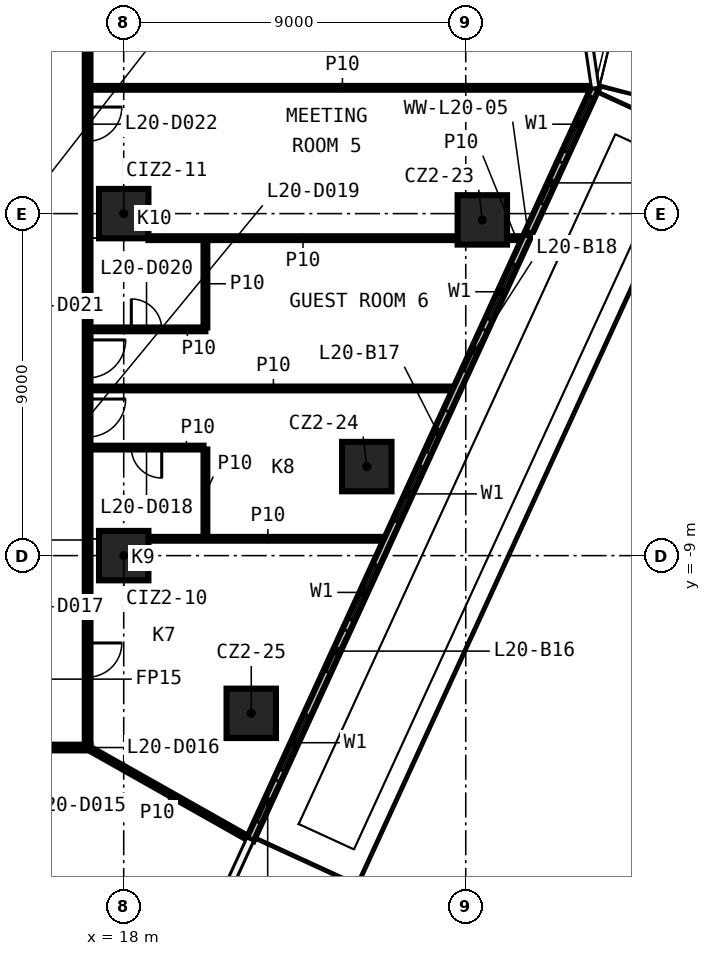
"""IFC4 building model, lengths in metres.
Left out: names, types, materials, properties, quantities, classifications, styles, units other than length and angle.
Written with IfcOpenShell. Run it as: python <this file> out.ifc"""

import sys

from ifc_helpers import new_model, si_unit, direction, frame, frame_2d, origin, origin_2d, place, context, subcontext, project, spatial, rectangle, extrude, element, fill, save


model = new_model("IFC4")
c1 = context("Model", 3, precision=1e-05, world=origin(), true_north=direction((0.0, 1.0)))
c2 = subcontext(c1, "Body", "Model", "MODEL_VIEW")
j1 = project(units=[si_unit("LENGTHUNIT", "METRE"), si_unit("PLANEANGLEUNIT", "RADIAN")], contexts=[c1])
p1 = place(None, origin())
s1 = spatial("IfcSite", under=j1, at=p1, CompositionType="ELEMENT")
p2 = place(p1, origin())
s2 = spatial("IfcBuilding", under=s1, at=p2, CompositionType="ELEMENT")
p3 = place(p2, frame((0.0, 0.0, 98.9)))
s3 = spatial("IfcBuildingStorey", under=s2, at=p3, CompositionType="ELEMENT", Elevation=98.9)
for number, where, z_axis, x_axis in (
    (1, (27.436, -0.165, 0.0), (0.0, 0.0, 1.0), (1.0, 0.0, 0.0)),
    (2, (24.396, -6.657, 0.0), (0.0, 0.0, 1.0), (1.0, 0.0, 0.0)),
    (3, (21.356, -13.15, 0.0), (0.0, 0.0, 1.0), (1.0, 0.0, 0.0)),
    (4, (18.0, -9.0, 0.0), (0.0, 0.0, 1.0), (1.0, 0.0, 0.0)),
    (5, (18.0, 0.0, 0.0), (0.0, 0.0, 1.0), (1.0, 0.0, 0.0)),
):
    element("IfcColumn", number, at=place(p3, frame(where, z_axis=z_axis, x_axis=x_axis)), inside=s3, PredefinedType="COLUMN", context=c2, shape_type="SweptSolid", body=[
        extrude(rectangle(XDim=1.3, YDim=1.3, at=origin_2d()), origin(), (0.0, 0.0, 1.0), 3.25),
    ])
p4 = place(p3, frame((17.125, -14.05, 0.0), z_axis=(0.0, 0.0, 1.0), x_axis=(-1.0, 0.0, 0.0)))
e6 = element("IfcWall", 6, at=p4, inside=s3, PredefinedType="PARTITIONING", context=c2, shape_type="SweptSolid", body=[
    extrude(rectangle(XDim=34.25, YDim=0.15, at=frame_2d((17.125, 0.0))), origin(), (0.0, 0.0, 1.0), 3.25),
])
p5 = place(p4, frame((32.158, 0.0, 0.0)))
e7 = element("IfcOpeningElement", 7, at=p5, cuts=e6, PredefinedType="OPENING", context=c2, shape_type="SweptSolid", body=[
    extrude(rectangle(XDim=0.9, YDim=2.1, at=frame_2d((0.45, 1.05))), frame((0.0, 0.085, 0.0), z_axis=(0.0, -1.0, 0.0), x_axis=(1.0, 0.0, 0.0)), (0.0, 0.0, 1.0), 0.17),
])
p6 = place(p4, frame((27.561, 0.0, 0.0)))
e8 = element("IfcOpeningElement", 8, at=p6, cuts=e6, PredefinedType="OPENING", context=c2, shape_type="SweptSolid", body=[
    extrude(rectangle(XDim=1.0, YDim=2.1, at=frame_2d((0.5, 1.05))), frame((0.0, 0.085, 0.0), z_axis=(0.0, -1.0, 0.0), x_axis=(1.0, 0.0, 0.0)), (0.0, 0.0, 1.0), 0.17),
])
p7 = place(p4, frame((18.64, 0.0, 0.0)))
e9 = element("IfcOpeningElement", 9, at=p7, cuts=e6, PredefinedType="OPENING", context=c2, shape_type="SweptSolid", body=[
    extrude(rectangle(XDim=1.0, YDim=2.1, at=frame_2d((0.5, 1.05))), frame((0.0, 0.085, 0.0), z_axis=(0.0, -1.0, 0.0), x_axis=(1.0, 0.0, 0.0)), (0.0, 0.0, 1.0), 0.17),
])
p8 = place(p4, frame((16.624, 0.0, 0.0)))
e10 = element("IfcOpeningElement", 10, at=p8, cuts=e6, PredefinedType="OPENING", context=c2, shape_type="SweptSolid", body=[
    extrude(rectangle(XDim=1.0, YDim=2.1, at=frame_2d((0.5, 1.05))), frame((0.0, 0.085, 0.0), z_axis=(0.0, -1.0, 0.0), x_axis=(1.0, 0.0, 0.0)), (0.0, 0.0, 1.0), 0.17),
])
p9 = place(p4, frame((9.807, 0.0, 0.0)))
e11 = element("IfcOpeningElement", 11, at=p9, cuts=e6, PredefinedType="OPENING", context=c2, shape_type="SweptSolid", body=[
    extrude(rectangle(XDim=1.0, YDim=2.1, at=frame_2d((0.5, 1.05))), frame((0.0, 0.085, 0.0), z_axis=(0.0, -1.0, 0.0), x_axis=(1.0, 0.0, 0.0)), (0.0, 0.0, 1.0), 0.17),
])
p10 = place(p4, frame((7.795, 0.0, 0.0)))
e12 = element("IfcOpeningElement", 12, at=p10, cuts=e6, PredefinedType="OPENING", context=c2, shape_type="SweptSolid", body=[
    extrude(rectangle(XDim=1.0, YDim=2.1, at=frame_2d((0.5, 1.05))), frame((0.0, 0.085, 0.0), z_axis=(0.0, -1.0, 0.0), x_axis=(1.0, 0.0, 0.0)), (0.0, 0.0, 1.0), 0.17),
])
p11 = place(p4, frame((1.119, 0.0, 0.0)))
e13 = element("IfcOpeningElement", 13, at=p11, cuts=e6, PredefinedType="OPENING", context=c2, shape_type="SweptSolid", body=[
    extrude(rectangle(XDim=1.0, YDim=2.1, at=frame_2d((0.5, 1.05))), frame((0.0, 0.085, 0.0), z_axis=(0.0, -1.0, 0.0), x_axis=(1.0, 0.0, 0.0)), (0.0, 0.0, 1.0), 0.17),
])
p12 = place(p3, frame((18.65, -8.557, 0.0), z_axis=(0.0, 0.0, 1.0), x_axis=(1.0, 0.0, 0.0)))
e14 = element("IfcWall", 14, at=p12, inside=s3, PredefinedType="PARTITIONING", context=c2, shape_type="SweptSolid", body=[
    extrude(rectangle(XDim=6.288, YDim=0.1, at=frame_2d((3.144, 0.0))), origin(), (0.0, 0.0, 1.0), 3.25),
])
p13 = place(p3, frame((20.1, -6.157, 0.0), z_axis=(0.0, 0.0, 1.0), x_axis=(-1.0, 0.0, 0.0)))
e15 = element("IfcWall", 15, at=p13, inside=s3, PredefinedType="PARTITIONING", context=c2, shape_type="SweptSolid", body=[
    extrude(rectangle(XDim=2.975, YDim=0.1, at=frame_2d((1.488, 0.0))), origin(), (0.0, 0.0, 1.0), 3.25),
])
p14 = place(p13, frame((1.1, 0.0, 0.0)))
e16 = element("IfcOpeningElement", 16, at=p14, cuts=e15, PredefinedType="OPENING", context=c2, shape_type="SweptSolid", body=[
    extrude(rectangle(XDim=0.8, YDim=2.1, at=frame_2d((0.4, 1.05))), frame((0.0, 0.06, 0.0), z_axis=(0.0, -1.0, 0.0), x_axis=(1.0, 0.0, 0.0)), (0.0, 0.0, 1.0), 0.12),
])
p15 = place(p3, frame((17.125, -4.601, 0.0), z_axis=(0.0, 0.0, 1.0), x_axis=(1.0, 0.0, 0.0)))
e17 = element("IfcWall", 17, at=p15, inside=s3, PredefinedType="PARTITIONING", context=c2, shape_type="SweptSolid", body=[
    extrude(rectangle(XDim=9.629, YDim=0.1, at=frame_2d((4.814, 0.0))), origin(), (0.0, 0.0, 1.0), 3.25),
])
p16 = place(p3, frame((17.125, -3.046, 0.0), z_axis=(0.0, 0.0, 1.0), x_axis=(1.0, 0.0, 0.0)))
e18 = element("IfcWall", 18, at=p16, inside=s3, PredefinedType="PARTITIONING", context=c2, shape_type="SweptSolid", body=[
    extrude(rectangle(XDim=3.025, YDim=0.1, at=frame_2d((1.512, 0.0))), origin(), (0.0, 0.0, 1.0), 3.25),
])
p17 = place(p16, frame((1.075, 0.0, 0.0)))
e19 = element("IfcOpeningElement", 19, at=p17, cuts=e18, PredefinedType="OPENING", context=c2, shape_type="SweptSolid", body=[
    extrude(rectangle(XDim=0.8, YDim=2.1, at=frame_2d((0.4, 1.05))), frame((0.0, 0.06, 0.0), z_axis=(0.0, -1.0, 0.0), x_axis=(1.0, 0.0, 0.0)), (0.0, 0.0, 1.0), 0.12),
])
p18 = place(p3, frame((18.65, -0.646, 0.0), z_axis=(0.0, 0.0, 1.0), x_axis=(1.0, 0.0, 0.0)))
e20 = element("IfcWall", 20, at=p18, inside=s3, PredefinedType="PARTITIONING", context=c2, shape_type="SweptSolid", body=[
    extrude(rectangle(XDim=8.136, YDim=0.1, at=frame_2d((4.068, 0.0))), origin(), (0.0, 0.0, 1.0), 3.25),
])
p19 = place(p3, frame((28.086, -0.646, 0.0), z_axis=(0.0, 0.0, 1.0), x_axis=(1.0, 0.0, 0.0)))
e21 = element("IfcWall", 21, at=p19, inside=s3, PredefinedType="PARTITIONING", context=c2, shape_type="SweptSolid", body=[
    extrude(rectangle(XDim=0.483, YDim=0.1, at=frame_2d((0.242, 0.0))), origin(), (0.0, 0.0, 1.0), 3.25),
])
p20 = place(p3, frame((17.125, 3.31, 0.0), z_axis=(0.0, 0.0, 1.0), x_axis=(1.0, 0.0, 0.0)))
e22 = element("IfcWall", 22, at=p20, inside=s3, PredefinedType="PARTITIONING", context=c2, shape_type="SweptSolid", body=[
    extrude(rectangle(XDim=13.26, YDim=0.1, at=frame_2d((6.63, 0.0))), origin(), (0.0, 0.0, 1.0), 3.25),
])
p21 = place(p3, frame((20.15, -8.507, 0.0), z_axis=(0.0, 0.0, 1.0), x_axis=(0.0, 1.0, 0.0)))
e23 = element("IfcWall", 23, at=p21, inside=s3, PredefinedType="PARTITIONING", context=c2, shape_type="SweptSolid", body=[
    extrude(rectangle(XDim=2.3, YDim=0.1, at=frame_2d((1.15, 0.0))), origin(), (0.0, 0.0, 1.0), 3.25),
])
p22 = place(p3, frame((20.15, -2.996, 0.0), z_axis=(0.0, 0.0, 1.0), x_axis=(0.0, 1.0, 0.0)))
e24 = element("IfcWall", 24, at=p22, inside=s3, PredefinedType="PARTITIONING", context=c2, shape_type="SweptSolid", body=[
    extrude(rectangle(XDim=2.3, YDim=0.1, at=frame_2d((1.15, 0.0))), origin(), (0.0, 0.0, 1.0), 3.25),
])
p23 = place(p3, frame((17.05, 13.975, 0.0), z_axis=(0.0, 0.0, 1.0), x_axis=(0.0, -1.0, 0.0)))
e25 = element("IfcWall", 25, at=p23, inside=s3, PredefinedType="PARTITIONING", context=c2, shape_type="SweptSolid", body=[
    extrude(rectangle(XDim=27.95, YDim=0.15, at=frame_2d((13.975, 0.0))), origin(), (0.0, 0.0, 1.0), 3.25),
])
p24 = place(p23, frame((25.274, 0.0, 0.0)))
e26 = element("IfcOpeningElement", 26, at=p24, cuts=e25, PredefinedType="OPENING", context=c2, shape_type="SweptSolid", body=[
    extrude(rectangle(XDim=0.9, YDim=2.1, at=frame_2d((0.45, 1.05))), frame((0.0, 0.085, 0.0), z_axis=(0.0, -1.0, 0.0), x_axis=(1.0, 0.0, 0.0)), (0.0, 0.0, 1.0), 0.17),
])
p25 = place(p23, frame((18.854, 0.0, 0.0)))
e27 = element("IfcOpeningElement", 27, at=p25, cuts=e25, PredefinedType="OPENING", context=c2, shape_type="SweptSolid", body=[
    extrude(rectangle(XDim=1.0, YDim=2.1, at=frame_2d((0.5, 1.05))), frame((0.0, 0.085, 0.0), z_axis=(0.0, -1.0, 0.0), x_axis=(1.0, 0.0, 0.0)), (0.0, 0.0, 1.0), 0.17),
])
p26 = place(p23, frame((17.299, 0.0, 0.0)))
e28 = element("IfcOpeningElement", 28, at=p26, cuts=e25, PredefinedType="OPENING", context=c2, shape_type="SweptSolid", body=[
    extrude(rectangle(XDim=1.0, YDim=2.1, at=frame_2d((0.5, 1.05))), frame((0.0, 0.085, 0.0), z_axis=(0.0, -1.0, 0.0), x_axis=(1.0, 0.0, 0.0)), (0.0, 0.0, 1.0), 0.17),
])
p27 = place(p23, frame((11.171, 0.0, 0.0)))
e29 = element("IfcOpeningElement", 29, at=p27, cuts=e25, PredefinedType="OPENING", context=c2, shape_type="SweptSolid", body=[
    extrude(rectangle(XDim=0.9, YDim=2.1, at=frame_2d((0.45, 1.05))), frame((0.0, 0.085, 0.0), z_axis=(0.0, -1.0, 0.0), x_axis=(1.0, 0.0, 0.0)), (0.0, 0.0, 1.0), 0.17),
])
p28 = place(p23, frame((7.243, 0.0, 0.0)))
e30 = element("IfcOpeningElement", 30, at=p28, cuts=e25, PredefinedType="OPENING", context=c2, shape_type="SweptSolid", body=[
    extrude(rectangle(XDim=0.9, YDim=2.1, at=frame_2d((0.45, 1.05))), frame((0.0, 0.085, 0.0), z_axis=(0.0, -1.0, 0.0), x_axis=(1.0, 0.0, 0.0)), (0.0, 0.0, 1.0), 0.17),
])
p29 = place(p23, frame((2.153, 0.0, 0.0)))
e31 = element("IfcOpeningElement", 31, at=p29, cuts=e25, PredefinedType="OPENING", context=c2, shape_type="SweptSolid", body=[
    extrude(rectangle(XDim=0.9, YDim=2.1, at=frame_2d((0.45, 1.05))), frame((0.0, 0.085, 0.0), z_axis=(0.0, -1.0, 0.0), x_axis=(1.0, 0.0, 0.0)), (0.0, 0.0, 1.0), 0.17),
])
p30 = place(p3, frame((17.05, -14.05, 0.0), z_axis=(0.0, 0.0, 1.0), x_axis=(0.87059349, -0.492003023537, 0.0)))
e32 = element("IfcWall", 32, at=p30, inside=s3, PredefinedType="PARTITIONING", context=c2, shape_type="SweptSolid", body=[
    extrude(rectangle(XDim=4.895, YDim=0.1, at=frame_2d((2.448, 0.0))), origin(), (0.0, 0.0, 1.0), 3.25),
])
p31 = place(p3, frame((21.329, -16.468, 0.0), z_axis=(0.0, 0.0, 1.0), x_axis=(0.417117833448, 0.908852415423, 0.0)))
e33 = element("IfcWall", 33, at=p31, inside=s3, PredefinedType="SOLIDWALL", context=c2, shape_type="SweptSolid", body=[
    extrude(rectangle(XDim=21.761, YDim=0.2, at=frame_2d((10.881, 0.0))), origin(), (0.0, 0.0, 1.0), 3.25),
])
p32 = place(p31, frame((2.0, 0.0, 0.6)))
e34 = element("IfcOpeningElement", 34, at=p32, cuts=e33, PredefinedType="OPENING", context=c2, shape_type="SweptSolid", body=[
    extrude(rectangle(XDim=1.6, YDim=2.4, at=frame_2d((0.8, 1.2))), frame((0.0, 0.11, 0.0), z_axis=(0.0, -1.0, 0.0), x_axis=(1.0, 0.0, 0.0)), (0.0, 0.0, 1.0), 0.22),
])
p33 = place(p31, frame((0.5, 0.0, 0.0)))
e35 = element("IfcOpeningElement", 35, at=p33, cuts=e33, PredefinedType="OPENING", context=c2, shape_type="SweptSolid", body=[
    extrude(rectangle(XDim=1.2, YDim=2.4, at=frame_2d((0.6, 1.2))), frame((0.0, 0.11, 0.0), z_axis=(0.0, -1.0, 0.0), x_axis=(1.0, 0.0, 0.0)), (0.0, 0.0, 1.0), 0.22),
])
p34 = place(p31, frame((6.352, 0.0, 0.6)))
e36 = element("IfcOpeningElement", 36, at=p34, cuts=e33, PredefinedType="OPENING", context=c2, shape_type="SweptSolid", body=[
    extrude(rectangle(XDim=1.6, YDim=2.4, at=frame_2d((0.8, 1.2))), frame((0.0, 0.11, 0.0), z_axis=(0.0, -1.0, 0.0), x_axis=(1.0, 0.0, 0.0)), (0.0, 0.0, 1.0), 0.22),
])
p35 = place(p31, frame((4.852, 0.0, 0.0)))
e37 = element("IfcOpeningElement", 37, at=p35, cuts=e33, PredefinedType="OPENING", context=c2, shape_type="SweptSolid", body=[
    extrude(rectangle(XDim=1.2, YDim=2.4, at=frame_2d((0.6, 1.2))), frame((0.0, 0.11, 0.0), z_axis=(0.0, -1.0, 0.0), x_axis=(1.0, 0.0, 0.0)), (0.0, 0.0, 1.0), 0.22),
])
p36 = place(p31, frame((9.205, 0.0, 0.6)))
e38 = element("IfcOpeningElement", 38, at=p36, cuts=e33, PredefinedType="OPENING", context=c2, shape_type="SweptSolid", body=[
    extrude(rectangle(XDim=1.6, YDim=2.4, at=frame_2d((0.8, 1.2))), frame((0.0, 0.11, 0.0), z_axis=(0.0, -1.0, 0.0), x_axis=(1.0, 0.0, 0.0)), (0.0, 0.0, 1.0), 0.22),
])
p37 = place(p31, frame((11.205, 0.0, 0.0)))
e39 = element("IfcOpeningElement", 39, at=p37, cuts=e33, PredefinedType="OPENING", context=c2, shape_type="SweptSolid", body=[
    extrude(rectangle(XDim=1.2, YDim=2.4, at=frame_2d((0.6, 1.2))), frame((0.0, 0.11, 0.0), z_axis=(0.0, -1.0, 0.0), x_axis=(1.0, 0.0, 0.0)), (0.0, 0.0, 1.0), 0.22),
])
p38 = place(p31, frame((15.057, 0.0, 0.6)))
e40 = element("IfcOpeningElement", 40, at=p38, cuts=e33, PredefinedType="OPENING", context=c2, shape_type="SweptSolid", body=[
    extrude(rectangle(XDim=1.6, YDim=2.4, at=frame_2d((0.8, 1.2))), frame((0.0, 0.11, 0.0), z_axis=(0.0, -1.0, 0.0), x_axis=(1.0, 0.0, 0.0)), (0.0, 0.0, 1.0), 0.22),
])
p39 = place(p31, frame((13.557, 0.0, 0.0)))
e41 = element("IfcOpeningElement", 41, at=p39, cuts=e33, PredefinedType="OPENING", context=c2, shape_type="SweptSolid", body=[
    extrude(rectangle(XDim=1.2, YDim=2.4, at=frame_2d((0.6, 1.2))), frame((0.0, 0.11, 0.0), z_axis=(0.0, -1.0, 0.0), x_axis=(1.0, 0.0, 0.0)), (0.0, 0.0, 1.0), 0.22),
])
p40 = place(p31, frame((19.909, 0.0, 0.6)))
e42 = element("IfcOpeningElement", 42, at=p40, cuts=e33, PredefinedType="OPENING", context=c2, shape_type="SweptSolid", body=[
    extrude(rectangle(XDim=1.6, YDim=2.4, at=frame_2d((0.8, 1.2))), frame((0.0, 0.11, 0.0), z_axis=(0.0, -1.0, 0.0), x_axis=(1.0, 0.0, 0.0)), (0.0, 0.0, 1.0), 0.22),
])
p41 = place(p31, frame((18.409, 0.0, 0.0)))
e43 = element("IfcOpeningElement", 43, at=p41, cuts=e33, PredefinedType="OPENING", context=c2, shape_type="SweptSolid", body=[
    extrude(rectangle(XDim=1.2, YDim=2.4, at=frame_2d((0.6, 1.2))), frame((0.0, 0.11, 0.0), z_axis=(0.0, -1.0, 0.0), x_axis=(1.0, 0.0, 0.0)), (0.0, 0.0, 1.0), 0.22),
])
p42 = place(p24, origin())
e44 = element("IfcDoor", 44, at=p42, inside=s3, OperationType="SINGLE_SWING_LEFT", PredefinedType="DOOR", context=c2, shape_type="SweptSolid", body=[
    extrude(rectangle(XDim=0.9, YDim=2.1, at=frame_2d((0.45, 1.05))), frame((0.0, 0.025, 0.0), z_axis=(0.0, -1.0, 0.0), x_axis=(1.0, 0.0, 0.0)), (0.0, 0.0, 1.0), 0.05),
])
fill(e26, e44)
p43 = place(p14, origin())
e45 = element("IfcDoor", 45, at=p43, inside=s3, OperationType="SINGLE_SWING_LEFT", PredefinedType="DOOR", context=c2, shape_type="SweptSolid", body=[
    extrude(rectangle(XDim=0.8, YDim=2.1, at=frame_2d((0.4, 1.05))), frame((0.0, 0.025, 0.0), z_axis=(0.0, -1.0, 0.0), x_axis=(1.0, 0.0, 0.0)), (0.0, 0.0, 1.0), 0.05),
])
fill(e16, e45)
p44 = place(p25, origin())
e46 = element("IfcDoor", 46, at=p44, inside=s3, OperationType="SINGLE_SWING_RIGHT", PredefinedType="DOOR", context=c2, shape_type="SweptSolid", body=[
    extrude(rectangle(XDim=1.0, YDim=2.1, at=frame_2d((0.5, 1.05))), frame((0.0, 0.025, 0.0), z_axis=(0.0, -1.0, 0.0), x_axis=(1.0, 0.0, 0.0)), (0.0, 0.0, 1.0), 0.05),
])
fill(e27, e46)
p45 = place(p17, origin())
e47 = element("IfcDoor", 47, at=p45, inside=s3, OperationType="SINGLE_SWING_RIGHT", PredefinedType="DOOR", context=c2, shape_type="SweptSolid", body=[
    extrude(rectangle(XDim=0.8, YDim=2.1, at=frame_2d((0.4, 1.05))), frame((0.0, 0.025, 0.0), z_axis=(0.0, -1.0, 0.0), x_axis=(1.0, 0.0, 0.0)), (0.0, 0.0, 1.0), 0.05),
])
fill(e19, e47)
p46 = place(p26, origin())
e48 = element("IfcDoor", 48, at=p46, inside=s3, OperationType="SINGLE_SWING_LEFT", PredefinedType="DOOR", context=c2, shape_type="SweptSolid", body=[
    extrude(rectangle(XDim=1.0, YDim=2.1, at=frame_2d((0.5, 1.05))), frame((0.0, 0.025, 0.0), z_axis=(0.0, -1.0, 0.0), x_axis=(1.0, 0.0, 0.0)), (0.0, 0.0, 1.0), 0.05),
])
fill(e28, e48)
p47 = place(p27, origin())
e49 = element("IfcDoor", 49, at=p47, inside=s3, OperationType="SINGLE_SWING_RIGHT", PredefinedType="DOOR", context=c2, shape_type="SweptSolid", body=[
    extrude(rectangle(XDim=0.9, YDim=2.1, at=frame_2d((0.45, 1.05))), frame((0.0, 0.025, 0.0), z_axis=(0.0, -1.0, 0.0), x_axis=(1.0, 0.0, 0.0)), (0.0, 0.0, 1.0), 0.05),
])
fill(e29, e49)
p48 = place(p32, origin())
e50 = element("IfcWindow", 50, at=p48, inside=s3, PartitioningType="SINGLE_PANEL", PredefinedType="WINDOW", context=c2, shape_type="SweptSolid", body=[
    extrude(rectangle(XDim=1.6, YDim=2.4, at=frame_2d((0.8, 1.2))), frame((0.0, 0.03, 0.0), z_axis=(0.0, -1.0, 0.0), x_axis=(1.0, 0.0, 0.0)), (0.0, 0.0, 1.0), 0.06),
])
fill(e34, e50)
p49 = place(p33, origin())
e51 = element("IfcDoor", 51, at=p49, inside=s3, OperationType="SLIDING_TO_LEFT", PredefinedType="DOOR", context=c2, shape_type="SweptSolid", body=[
    extrude(rectangle(XDim=1.2, YDim=2.4, at=frame_2d((0.6, 1.2))), frame((0.0, 0.025, 0.0), z_axis=(0.0, -1.0, 0.0), x_axis=(1.0, 0.0, 0.0)), (0.0, 0.0, 1.0), 0.05),
])
fill(e35, e51)
p50 = place(p34, origin())
e52 = element("IfcWindow", 52, at=p50, inside=s3, PartitioningType="SINGLE_PANEL", PredefinedType="WINDOW", context=c2, shape_type="SweptSolid", body=[
    extrude(rectangle(XDim=1.6, YDim=2.4, at=frame_2d((0.8, 1.2))), frame((0.0, 0.03, 0.0), z_axis=(0.0, -1.0, 0.0), x_axis=(1.0, 0.0, 0.0)), (0.0, 0.0, 1.0), 0.06),
])
fill(e36, e52)
p51 = place(p35, origin())
e53 = element("IfcDoor", 53, at=p51, inside=s3, OperationType="SLIDING_TO_LEFT", PredefinedType="DOOR", context=c2, shape_type="SweptSolid", body=[
    extrude(rectangle(XDim=1.2, YDim=2.4, at=frame_2d((0.6, 1.2))), frame((0.0, 0.025, 0.0), z_axis=(0.0, -1.0, 0.0), x_axis=(1.0, 0.0, 0.0)), (0.0, 0.0, 1.0), 0.05),
])
fill(e37, e53)
p52 = place(p36, origin())
e54 = element("IfcWindow", 54, at=p52, inside=s3, PartitioningType="SINGLE_PANEL", PredefinedType="WINDOW", context=c2, shape_type="SweptSolid", body=[
    extrude(rectangle(XDim=1.6, YDim=2.4, at=frame_2d((0.8, 1.2))), frame((0.0, 0.03, 0.0), z_axis=(0.0, -1.0, 0.0), x_axis=(1.0, 0.0, 0.0)), (0.0, 0.0, 1.0), 0.06),
])
fill(e38, e54)
p53 = place(p37, origin())
e55 = element("IfcDoor", 55, at=p53, inside=s3, OperationType="SLIDING_TO_LEFT", PredefinedType="DOOR", context=c2, shape_type="SweptSolid", body=[
    extrude(rectangle(XDim=1.2, YDim=2.4, at=frame_2d((0.6, 1.2))), frame((0.0, 0.025, 0.0), z_axis=(0.0, -1.0, 0.0), x_axis=(1.0, 0.0, 0.0)), (0.0, 0.0, 1.0), 0.05),
])
fill(e39, e55)
p54 = place(p38, origin())
e56 = element("IfcWindow", 56, at=p54, inside=s3, PartitioningType="SINGLE_PANEL", PredefinedType="WINDOW", context=c2, shape_type="SweptSolid", body=[
    extrude(rectangle(XDim=1.6, YDim=2.4, at=frame_2d((0.8, 1.2))), frame((0.0, 0.03, 0.0), z_axis=(0.0, -1.0, 0.0), x_axis=(1.0, 0.0, 0.0)), (0.0, 0.0, 1.0), 0.06),
])
fill(e40, e56)
p55 = place(p39, origin())
e57 = element("IfcDoor", 57, at=p55, inside=s3, OperationType="SLIDING_TO_LEFT", PredefinedType="DOOR", context=c2, shape_type="SweptSolid", body=[
    extrude(rectangle(XDim=1.2, YDim=2.4, at=frame_2d((0.6, 1.2))), frame((0.0, 0.025, 0.0), z_axis=(0.0, -1.0, 0.0), x_axis=(1.0, 0.0, 0.0)), (0.0, 0.0, 1.0), 0.05),
])
fill(e41, e57)
p56 = place(p40, origin())
e58 = element("IfcWindow", 58, at=p56, inside=s3, PartitioningType="SINGLE_PANEL", PredefinedType="WINDOW", context=c2, shape_type="SweptSolid", body=[
    extrude(rectangle(XDim=1.6, YDim=2.4, at=frame_2d((0.8, 1.2))), frame((0.0, 0.03, 0.0), z_axis=(0.0, -1.0, 0.0), x_axis=(1.0, 0.0, 0.0)), (0.0, 0.0, 1.0), 0.06),
])
fill(e42, e58)
p57 = place(p41, origin())
e59 = element("IfcDoor", 59, at=p57, inside=s3, OperationType="SLIDING_TO_LEFT", PredefinedType="DOOR", context=c2, shape_type="SweptSolid", body=[
    extrude(rectangle(XDim=1.2, YDim=2.4, at=frame_2d((0.6, 1.2))), frame((0.0, 0.025, 0.0), z_axis=(0.0, -1.0, 0.0), x_axis=(1.0, 0.0, 0.0)), (0.0, 0.0, 1.0), 0.05),
])
fill(e43, e59)
save(model, sys.argv[1])
